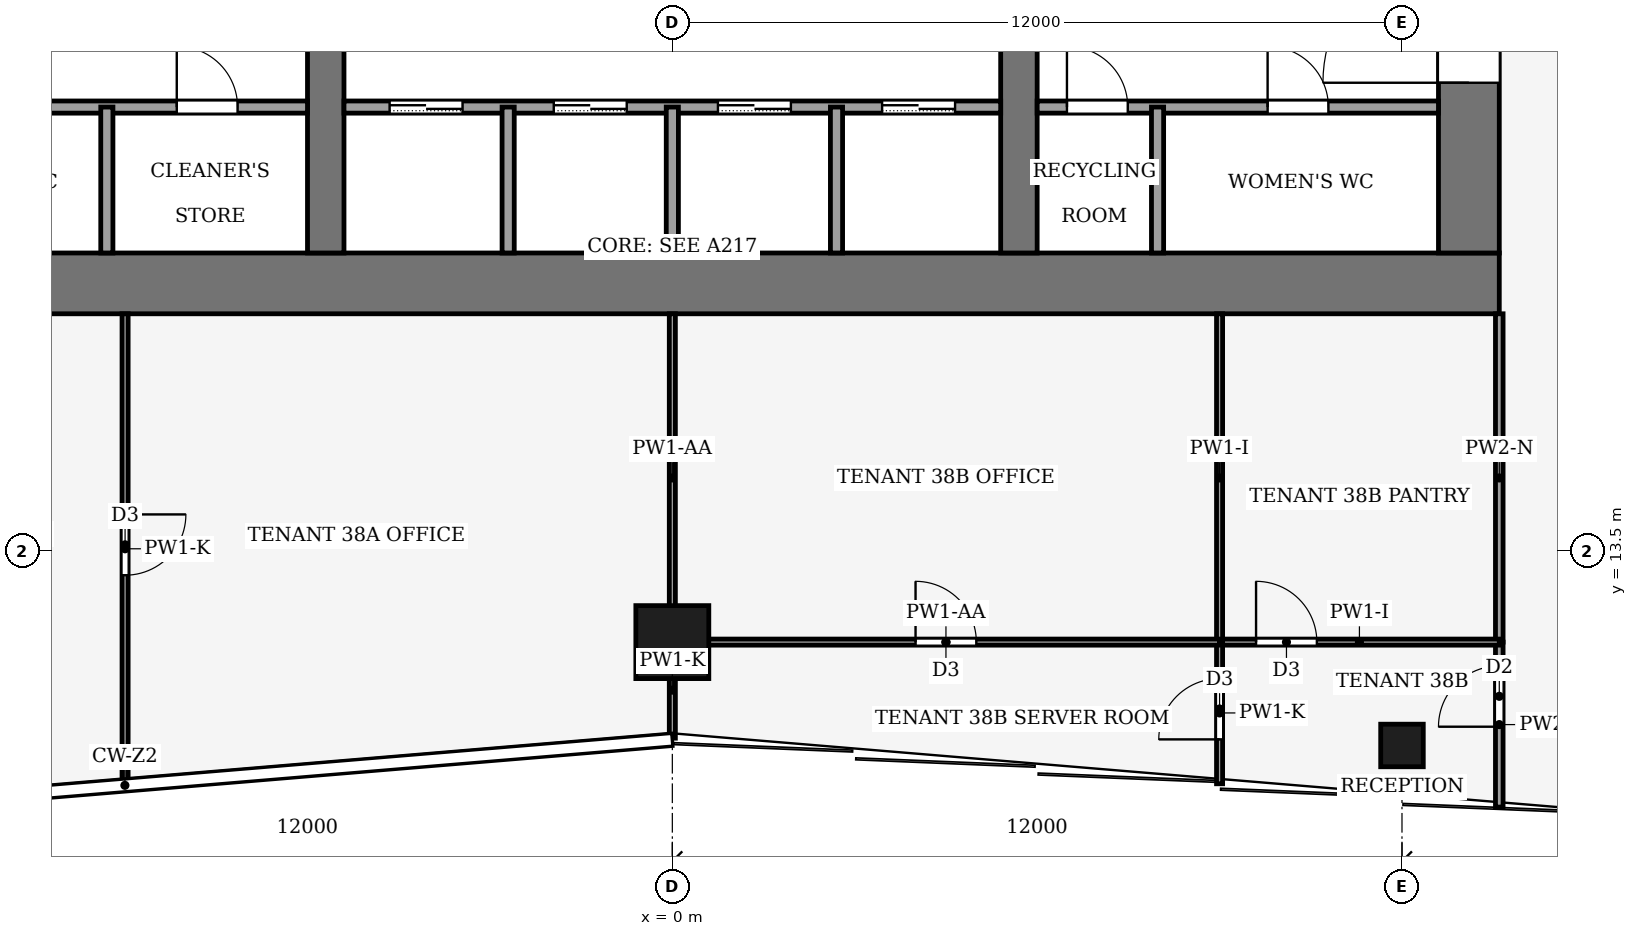
"""IFC4 building model, lengths in metres.
Left out: names, types, materials, properties, quantities, classifications, styles, units other than length and angle.
Written with IfcOpenShell. Run it as: python <this file> out.ifc"""

import sys

from ifc_helpers import new_model, si_unit, direction, frame, frame_2d, origin, origin_2d, place, context, subcontext, project, spatial, rectangle, hollow_rectangle, extrude, element, fill, save


model = new_model("IFC4")
c1 = context("Model", 3, precision=1e-05, world=origin(), true_north=direction((0.0, 1.0)))
c2 = subcontext(c1, "Body", "Model", "MODEL_VIEW")
j1 = project(units=[si_unit("LENGTHUNIT", "METRE"), si_unit("PLANEANGLEUNIT", "RADIAN")], contexts=[c1])
p1 = place(None, origin())
s1 = spatial("IfcSite", under=j1, at=p1, CompositionType="ELEMENT")
p2 = place(p1, origin())
s2 = spatial("IfcBuilding", under=s1, at=p2, CompositionType="ELEMENT")
p3 = place(p2, frame((0.0, 0.0, 166.0)))
s3 = spatial("IfcBuildingStorey", under=s2, at=p3, CompositionType="ELEMENT", Elevation=166.0)
p4 = place(p3, frame((-13.6, 17.9, -0.13), z_axis=(0.0, 0.0, 1.0), x_axis=(1.0, 0.0, 0.0)))
e1 = element("IfcWall", 1, at=p4, inside=s3, PredefinedType="SHEAR", context=c2, shape_type="SweptSolid", body=[
    extrude(rectangle(XDim=27.2, YDim=1.0, at=frame_2d((13.6, 0.0))), origin(), (0.0, 0.0, 1.0), 3.88),
])
p5 = place(p3, frame((13.1, 18.4, -0.13), z_axis=(0.0, 0.0, 1.0), x_axis=(0.0, 1.0, 0.0)))
e2 = element("IfcWall", 2, at=p5, inside=s3, PredefinedType="SHEAR", context=c2, shape_type="SweptSolid", body=[
    extrude(rectangle(XDim=19.2, YDim=1.0, at=frame_2d((9.6, 0.0))), origin(), (0.0, 0.0, 1.0), 3.88),
])
p6 = place(p5, frame((2.8, 0.0, 0.13)))
e3 = element("IfcOpeningElement", 3, at=p6, cuts=e2, PredefinedType="OPENING", context=c2, shape_type="SweptSolid", body=[
    extrude(rectangle(XDim=2.4, YDim=2.4, at=frame_2d((1.2, 1.2))), frame((0.0, 0.51, 0.0), z_axis=(0.0, -1.0, 0.0), x_axis=(1.0, 0.0, 0.0)), (0.0, 0.0, 1.0), 1.02),
])
p7 = place(p5, frame((13.3, 0.0, 0.13)))
e4 = element("IfcOpeningElement", 4, at=p7, cuts=e2, PredefinedType="OPENING", context=c2, shape_type="SweptSolid", body=[
    extrude(rectangle(XDim=2.4, YDim=2.4, at=frame_2d((1.2, 1.2))), frame((0.0, 0.51, 0.0), z_axis=(0.0, -1.0, 0.0), x_axis=(1.0, 0.0, 0.0)), (0.0, 0.0, 1.0), 1.02),
])
p8 = place(p3, frame((-5.7, 18.4, -0.13), z_axis=(0.0, 0.0, 1.0), x_axis=(0.0, 1.0, 0.0)))
e5 = element("IfcWall", 5, at=p8, inside=s3, PredefinedType="SHEAR", context=c2, shape_type="SweptSolid", body=[
    extrude(rectangle(XDim=19.2, YDim=0.6, at=frame_2d((9.6, 0.0))), origin(), (0.0, 0.0, 1.0), 3.88),
])
p9 = place(p8, frame((8.35, 0.0, 0.13)))
e6 = element("IfcOpeningElement", 6, at=p9, cuts=e5, PredefinedType="OPENING", context=c2, shape_type="SweptSolid", body=[
    extrude(rectangle(XDim=0.9, YDim=2.1, at=frame_2d((0.45, 1.05))), frame((0.0, 0.31, 0.0), z_axis=(0.0, -1.0, 0.0), x_axis=(1.0, 0.0, 0.0)), (0.0, 0.0, 1.0), 0.62),
])
p10 = place(p3, frame((5.7, 18.4, -0.13), z_axis=(0.0, 0.0, 1.0), x_axis=(0.0, 1.0, 0.0)))
e7 = element("IfcWall", 7, at=p10, inside=s3, PredefinedType="SHEAR", context=c2, shape_type="SweptSolid", body=[
    extrude(rectangle(XDim=19.2, YDim=0.6, at=frame_2d((9.6, 0.0))), origin(), (0.0, 0.0, 1.0), 3.88),
])
p11 = place(p10, frame((8.35, 0.0, 0.13)))
e8 = element("IfcOpeningElement", 8, at=p11, cuts=e7, PredefinedType="OPENING", context=c2, shape_type="SweptSolid", body=[
    extrude(rectangle(XDim=0.9, YDim=2.1, at=frame_2d((0.45, 1.05))), frame((0.0, 0.31, 0.0), z_axis=(0.0, -1.0, 0.0), x_axis=(1.0, 0.0, 0.0)), (0.0, 0.0, 1.0), 0.62),
])
p12 = place(p10, frame((13.3, 0.0, 0.13)))
e9 = element("IfcOpeningElement", 9, at=p12, cuts=e7, PredefinedType="OPENING", context=c2, shape_type="SweptSolid", body=[
    extrude(rectangle(XDim=2.4, YDim=2.4, at=frame_2d((1.2, 1.2))), frame((0.0, 0.31, 0.0), z_axis=(0.0, -1.0, 0.0), x_axis=(1.0, 0.0, 0.0)), (0.0, 0.0, 1.0), 0.62),
])
p13 = place(p3, frame((0.0, 12.0, 0.0), z_axis=(0.0, 0.0, 1.0), x_axis=(1.0, 0.0, 0.0)))
e10 = element("IfcColumn", 10, at=p13, inside=s3, PredefinedType="COLUMN", context=c2, shape_type="SweptSolid", body=[
    extrude(hollow_rectangle(XDim=1.2, YDim=1.2, WallThickness=0.07, at=origin_2d()), origin(), (0.0, 0.0, 1.0), 4.0),
])
p14 = place(p3, frame((12.0, 10.3, 0.0), z_axis=(0.0, 0.0, 1.0), x_axis=(1.0, 0.0, 0.0)))
e11 = element("IfcColumn", 11, at=p14, inside=s3, PredefinedType="COLUMN", context=c2, shape_type="SweptSolid", body=[
    extrude(hollow_rectangle(XDim=0.7, YDim=0.7, WallThickness=0.03, at=origin_2d()), origin(), (0.0, 0.0, 1.0), 4.0),
])
p15 = place(p3, frame((-12.6, 20.8, 0.0), z_axis=(0.0, 0.0, 1.0), x_axis=(1.0, 0.0, 0.0)))
e12 = element("IfcWall", 12, at=p15, inside=s3, PredefinedType="PARTITIONING", context=c2, shape_type="SweptSolid", body=[
    extrude(rectangle(XDim=6.6, YDim=0.2, at=frame_2d((3.3, 0.0))), origin(), (0.0, 0.0, 1.0), 3.75),
])
p16 = place(p15, frame((1.15, 0.0, 0.0)))
e13 = element("IfcOpeningElement", 13, at=p16, cuts=e12, PredefinedType="OPENING", context=c2, shape_type="SweptSolid", body=[
    extrude(rectangle(XDim=1.0, YDim=2.1, at=frame_2d((0.5, 1.05))), frame((0.0, 0.11, 0.0), z_axis=(0.0, -1.0, 0.0), x_axis=(1.0, 0.0, 0.0)), (0.0, 0.0, 1.0), 0.22),
])
p17 = place(p15, frame((4.45, 0.0, 0.0)))
e14 = element("IfcOpeningElement", 14, at=p17, cuts=e12, PredefinedType="OPENING", context=c2, shape_type="SweptSolid", body=[
    extrude(rectangle(XDim=1.0, YDim=2.1, at=frame_2d((0.5, 1.05))), frame((0.0, 0.11, 0.0), z_axis=(0.0, -1.0, 0.0), x_axis=(1.0, 0.0, 0.0)), (0.0, 0.0, 1.0), 0.22),
])
p18 = place(p3, frame((-5.4, 20.8, 0.0), z_axis=(0.0, 0.0, 1.0), x_axis=(1.0, 0.0, 0.0)))
e15 = element("IfcWall", 15, at=p18, inside=s3, PredefinedType="PARTITIONING", context=c2, shape_type="SweptSolid", body=[
    extrude(rectangle(XDim=10.8, YDim=0.2, at=frame_2d((5.4, 0.0))), origin(), (0.0, 0.0, 1.0), 3.75),
])
p19 = place(p18, frame((0.75, 0.0, 0.0)))
e16 = element("IfcOpeningElement", 16, at=p19, cuts=e15, PredefinedType="OPENING", context=c2, shape_type="SweptSolid", body=[
    extrude(rectangle(XDim=1.2, YDim=2.2, at=frame_2d((0.6, 1.1))), frame((0.0, 0.11, 0.0), z_axis=(0.0, -1.0, 0.0), x_axis=(1.0, 0.0, 0.0)), (0.0, 0.0, 1.0), 0.22),
])
p20 = place(p18, frame((3.45, 0.0, 0.0)))
e17 = element("IfcOpeningElement", 17, at=p20, cuts=e15, PredefinedType="OPENING", context=c2, shape_type="SweptSolid", body=[
    extrude(rectangle(XDim=1.2, YDim=2.2, at=frame_2d((0.6, 1.1))), frame((0.0, 0.11, 0.0), z_axis=(0.0, -1.0, 0.0), x_axis=(1.0, 0.0, 0.0)), (0.0, 0.0, 1.0), 0.22),
])
p21 = place(p18, frame((6.15, 0.0, 0.0)))
e18 = element("IfcOpeningElement", 18, at=p21, cuts=e15, PredefinedType="OPENING", context=c2, shape_type="SweptSolid", body=[
    extrude(rectangle(XDim=1.2, YDim=2.2, at=frame_2d((0.6, 1.1))), frame((0.0, 0.11, 0.0), z_axis=(0.0, -1.0, 0.0), x_axis=(1.0, 0.0, 0.0)), (0.0, 0.0, 1.0), 0.22),
])
p22 = place(p18, frame((8.85, 0.0, 0.0)))
e19 = element("IfcOpeningElement", 19, at=p22, cuts=e15, PredefinedType="OPENING", context=c2, shape_type="SweptSolid", body=[
    extrude(rectangle(XDim=1.2, YDim=2.2, at=frame_2d((0.6, 1.1))), frame((0.0, 0.11, 0.0), z_axis=(0.0, -1.0, 0.0), x_axis=(1.0, 0.0, 0.0)), (0.0, 0.0, 1.0), 0.22),
])
p23 = place(p3, frame((6.0, 20.8, 0.0), z_axis=(0.0, 0.0, 1.0), x_axis=(1.0, 0.0, 0.0)))
e20 = element("IfcWall", 20, at=p23, inside=s3, PredefinedType="PARTITIONING", context=c2, shape_type="SweptSolid", body=[
    extrude(rectangle(XDim=6.6, YDim=0.2, at=frame_2d((3.3, 0.0))), origin(), (0.0, 0.0, 1.0), 3.75),
])
p24 = place(p23, frame((0.49, 0.0, 0.0)))
e21 = element("IfcOpeningElement", 21, at=p24, cuts=e20, PredefinedType="OPENING", context=c2, shape_type="SweptSolid", body=[
    extrude(rectangle(XDim=1.0, YDim=2.1, at=frame_2d((0.5, 1.05))), frame((0.0, 0.11, 0.0), z_axis=(0.0, -1.0, 0.0), x_axis=(1.0, 0.0, 0.0)), (0.0, 0.0, 1.0), 0.22),
])
p25 = place(p23, frame((3.79, 0.0, 0.0)))
e22 = element("IfcOpeningElement", 22, at=p25, cuts=e20, PredefinedType="OPENING", context=c2, shape_type="SweptSolid", body=[
    extrude(rectangle(XDim=1.0, YDim=2.1, at=frame_2d((0.5, 1.05))), frame((0.0, 0.11, 0.0), z_axis=(0.0, -1.0, 0.0), x_axis=(1.0, 0.0, 0.0)), (0.0, 0.0, 1.0), 0.22),
])
for number, where, z_axis, x_axis in (
    (23, (-9.3, 18.4, 0.0), (0.0, 0.0, 1.0), (0.0, 1.0, 0.0)),
    (24, (-2.7, 18.4, 0.0), (0.0, 0.0, 1.0), (0.0, 1.0, 0.0)),
    (25, (0.0, 18.4, 0.0), (0.0, 0.0, 1.0), (0.0, 1.0, 0.0)),
    (26, (2.7, 18.4, 0.0), (0.0, 0.0, 1.0), (0.0, 1.0, 0.0)),
    (27, (7.98, 18.4, 0.0), (0.0, 0.0, 1.0), (0.0, 1.0, 0.0)),
):
    element("IfcWall", number, at=place(p3, frame(where, z_axis=z_axis, x_axis=x_axis)), inside=s3, PredefinedType="PARTITIONING", context=c2, shape_type="SweptSolid", body=[
        extrude(rectangle(XDim=2.4, YDim=0.2, at=frame_2d((1.2, 0.0))), origin(), (0.0, 0.0, 1.0), 3.75),
    ])
p26 = place(p3, frame((13.6, 9.287, 0.0), z_axis=(0.0, 0.0, 1.0), x_axis=(0.0, 1.0, 0.0)))
e28 = element("IfcWall", 28, at=p26, inside=s3, PredefinedType="PARTITIONING", context=c2, shape_type="SweptSolid", body=[
    extrude(rectangle(XDim=2.713, YDim=0.125, at=frame_2d((1.357, 0.0))), origin(), (0.0, 0.0, 1.0), 2.92),
])
p27 = place(p26, frame((1.322, 0.0, 0.0)))
e29 = element("IfcOpeningElement", 29, at=p27, cuts=e28, PredefinedType="OPENING", context=c2, shape_type="SweptSolid", body=[
    extrude(rectangle(XDim=1.0, YDim=2.1, at=frame_2d((0.5, 1.05))), frame((0.0, 0.073, 0.0), z_axis=(0.0, -1.0, 0.0), x_axis=(1.0, 0.0, 0.0)), (0.0, 0.0, 1.0), 0.145),
])
p28 = place(p3, frame((13.6, 12.0, 0.0), z_axis=(0.0, 0.0, 1.0), x_axis=(0.0, 1.0, 0.0)))
e30 = element("IfcWall", 30, at=p28, inside=s3, PredefinedType="PARTITIONING", context=c2, shape_type="SweptSolid", body=[
    extrude(rectangle(XDim=5.4, YDim=0.125, at=frame_2d((2.7, 0.0))), origin(), (0.0, 0.0, 1.0), 3.02),
])
p29 = place(p3, frame((-9.0, 17.4, 0.0), z_axis=(0.0, 0.0, 1.0), x_axis=(0.0, -1.0, 0.0)))
e31 = element("IfcWall", 31, at=p29, inside=s3, PredefinedType="PARTITIONING", context=c2, shape_type="SweptSolid", body=[
    extrude(rectangle(XDim=7.73, YDim=0.1, at=frame_2d((3.865, 0.0))), origin(), (0.0, 0.0, 1.0), 2.92),
])
p30 = place(p29, frame((3.3, 0.0, 0.0)))
e32 = element("IfcOpeningElement", 32, at=p30, cuts=e31, PredefinedType="OPENING", context=c2, shape_type="SweptSolid", body=[
    extrude(rectangle(XDim=1.0, YDim=2.1, at=frame_2d((0.5, 1.05))), frame((0.0, 0.06, 0.0), z_axis=(0.0, -1.0, 0.0), x_axis=(1.0, 0.0, 0.0)), (0.0, 0.0, 1.0), 0.12),
])
p31 = place(p3, frame((0.0, 10.42, 0.0), z_axis=(0.0, 0.0, 1.0), x_axis=(0.0, 1.0, 0.0)))
e33 = element("IfcWall", 33, at=p31, inside=s3, PredefinedType="PARTITIONING", context=c2, shape_type="SweptSolid", body=[
    extrude(rectangle(XDim=1.58, YDim=0.1, at=frame_2d((0.79, 0.0))), origin(), (0.0, 0.0, 1.0), 2.92),
])
p32 = place(p3, frame((0.0, 12.0, 0.0), z_axis=(0.0, 0.0, 1.0), x_axis=(0.0, 1.0, 0.0)))
e34 = element("IfcWall", 34, at=p32, inside=s3, PredefinedType="PARTITIONING", context=c2, shape_type="SweptSolid", body=[
    extrude(rectangle(XDim=5.4, YDim=0.1, at=frame_2d((2.7, 0.0))), origin(), (0.0, 0.0, 1.0), 3.42),
])
p33 = place(p3, frame((9.0, 12.0, 0.0), z_axis=(0.0, 0.0, 1.0), x_axis=(1.0, 0.0, 0.0)))
e35 = element("IfcWall", 35, at=p33, inside=s3, PredefinedType="PARTITIONING", context=c2, shape_type="SweptSolid", body=[
    extrude(rectangle(XDim=4.6, YDim=0.1, at=frame_2d((2.3, 0.0))), origin(), (0.0, 0.0, 1.0), 3.75),
])
p34 = place(p33, frame((0.6, 0.0, 0.0)))
e36 = element("IfcOpeningElement", 36, at=p34, cuts=e35, PredefinedType="OPENING", context=c2, shape_type="SweptSolid", body=[
    extrude(rectangle(XDim=1.0, YDim=2.1, at=frame_2d((0.5, 1.05))), frame((0.0, 0.06, 0.0), z_axis=(0.0, -1.0, 0.0), x_axis=(1.0, 0.0, 0.0)), (0.0, 0.0, 1.0), 0.12),
])
p35 = place(p3, frame((9.0, 9.67, 0.0), z_axis=(0.0, 0.0, 1.0), x_axis=(0.0, 1.0, 0.0)))
e37 = element("IfcWall", 37, at=p35, inside=s3, PredefinedType="PARTITIONING", context=c2, shape_type="SweptSolid", body=[
    extrude(rectangle(XDim=2.33, YDim=0.1, at=frame_2d((1.165, 0.0))), origin(), (0.0, 0.0, 1.0), 2.92),
])
p36 = place(p35, frame((0.73, 0.0, 0.0)))
e38 = element("IfcOpeningElement", 38, at=p36, cuts=e37, PredefinedType="OPENING", context=c2, shape_type="SweptSolid", body=[
    extrude(rectangle(XDim=1.0, YDim=2.1, at=frame_2d((0.5, 1.05))), frame((0.0, 0.06, 0.0), z_axis=(0.0, -1.0, 0.0), x_axis=(1.0, 0.0, 0.0)), (0.0, 0.0, 1.0), 0.12),
])
p37 = place(p3, frame((9.0, 17.4, 0.0), z_axis=(0.0, 0.0, 1.0), x_axis=(0.0, -1.0, 0.0)))
e39 = element("IfcWall", 39, at=p37, inside=s3, PredefinedType="PARTITIONING", context=c2, shape_type="SweptSolid", body=[
    extrude(rectangle(XDim=5.4, YDim=0.1, at=frame_2d((2.7, 0.0))), origin(), (0.0, 0.0, 1.0), 3.75),
])
p38 = place(p3, frame((0.0, 12.0, 0.0), z_axis=(0.0, 0.0, 1.0), x_axis=(1.0, 0.0, 0.0)))
e40 = element("IfcWall", 40, at=p38, inside=s3, PredefinedType="PARTITIONING", context=c2, shape_type="SweptSolid", body=[
    extrude(rectangle(XDim=9.0, YDim=0.1, at=frame_2d((4.5, 0.0))), origin(), (0.0, 0.0, 1.0), 3.42),
])
p39 = place(p38, frame((4.0, 0.0, 0.0)))
e41 = element("IfcOpeningElement", 41, at=p39, cuts=e40, PredefinedType="OPENING", context=c2, shape_type="SweptSolid", body=[
    extrude(rectangle(XDim=1.0, YDim=2.1, at=frame_2d((0.5, 1.05))), frame((0.0, 0.06, 0.0), z_axis=(0.0, -1.0, 0.0), x_axis=(1.0, 0.0, 0.0)), (0.0, 0.0, 1.0), 0.12),
])
p40 = place(p19, origin())
e42 = element("IfcDoor", 42, at=p40, inside=s3, OperationType="SLIDING_TO_LEFT", PredefinedType="DOOR", context=c2, shape_type="SweptSolid", body=[
    extrude(rectangle(XDim=1.2, YDim=2.2, at=frame_2d((0.6, 1.1))), frame((0.0, 0.025, 0.0), z_axis=(0.0, -1.0, 0.0), x_axis=(1.0, 0.0, 0.0)), (0.0, 0.0, 1.0), 0.05),
])
fill(e16, e42)
p41 = place(p20, origin())
e43 = element("IfcDoor", 43, at=p41, inside=s3, OperationType="SLIDING_TO_LEFT", PredefinedType="DOOR", context=c2, shape_type="SweptSolid", body=[
    extrude(rectangle(XDim=1.2, YDim=2.2, at=frame_2d((0.6, 1.1))), frame((0.0, 0.025, 0.0), z_axis=(0.0, -1.0, 0.0), x_axis=(1.0, 0.0, 0.0)), (0.0, 0.0, 1.0), 0.05),
])
fill(e17, e43)
p42 = place(p21, origin())
e44 = element("IfcDoor", 44, at=p42, inside=s3, OperationType="SLIDING_TO_LEFT", PredefinedType="DOOR", context=c2, shape_type="SweptSolid", body=[
    extrude(rectangle(XDim=1.2, YDim=2.2, at=frame_2d((0.6, 1.1))), frame((0.0, 0.025, 0.0), z_axis=(0.0, -1.0, 0.0), x_axis=(1.0, 0.0, 0.0)), (0.0, 0.0, 1.0), 0.05),
])
fill(e18, e44)
p43 = place(p22, origin())
e45 = element("IfcDoor", 45, at=p43, inside=s3, OperationType="SLIDING_TO_LEFT", PredefinedType="DOOR", context=c2, shape_type="SweptSolid", body=[
    extrude(rectangle(XDim=1.2, YDim=2.2, at=frame_2d((0.6, 1.1))), frame((0.0, 0.025, 0.0), z_axis=(0.0, -1.0, 0.0), x_axis=(1.0, 0.0, 0.0)), (0.0, 0.0, 1.0), 0.05),
])
fill(e19, e45)
p44 = place(p17, origin())
e46 = element("IfcDoor", 46, at=p44, inside=s3, OperationType="SINGLE_SWING_LEFT", PredefinedType="DOOR", context=c2, shape_type="SweptSolid", body=[
    extrude(rectangle(XDim=1.0, YDim=2.1, at=frame_2d((0.5, 1.05))), frame((0.0, 0.025, 0.0), z_axis=(0.0, -1.0, 0.0), x_axis=(1.0, 0.0, 0.0)), (0.0, 0.0, 1.0), 0.05),
])
fill(e14, e46)
p45 = place(p24, origin())
e47 = element("IfcDoor", 47, at=p45, inside=s3, OperationType="SINGLE_SWING_RIGHT", PredefinedType="DOOR", context=c2, shape_type="SweptSolid", body=[
    extrude(rectangle(XDim=1.0, YDim=2.1, at=frame_2d((0.5, 1.05))), frame((0.0, 0.025, 0.0), z_axis=(0.0, -1.0, 0.0), x_axis=(1.0, 0.0, 0.0)), (0.0, 0.0, 1.0), 0.05),
])
fill(e21, e47)
p46 = place(p25, origin())
e48 = element("IfcDoor", 48, at=p46, inside=s3, OperationType="SINGLE_SWING_RIGHT", PredefinedType="DOOR", context=c2, shape_type="SweptSolid", body=[
    extrude(rectangle(XDim=1.0, YDim=2.1, at=frame_2d((0.5, 1.05))), frame((0.0, 0.025, 0.0), z_axis=(0.0, -1.0, 0.0), x_axis=(1.0, 0.0, 0.0)), (0.0, 0.0, 1.0), 0.05),
])
fill(e22, e48)
p47 = place(p6, origin())
e49 = element("IfcDoor", 49, at=p47, inside=s3, OperationType="DOUBLE_DOOR_SINGLE_SWING", PredefinedType="DOOR", context=c2, shape_type="SweptSolid", body=[
    extrude(rectangle(XDim=2.4, YDim=2.4, at=frame_2d((1.2, 1.2))), frame((0.0, 0.025, 0.0), z_axis=(0.0, -1.0, 0.0), x_axis=(1.0, 0.0, 0.0)), (0.0, 0.0, 1.0), 0.05),
])
fill(e3, e49)
p48 = place(p27, origin())
e50 = element("IfcDoor", 50, at=p48, inside=s3, OperationType="SINGLE_SWING_RIGHT", PredefinedType="DOOR", context=c2, shape_type="SweptSolid", body=[
    extrude(rectangle(XDim=1.0, YDim=2.1, at=frame_2d((0.5, 1.05))), frame((0.0, 0.025, 0.0), z_axis=(0.0, -1.0, 0.0), x_axis=(1.0, 0.0, 0.0)), (0.0, 0.0, 1.0), 0.05),
])
fill(e29, e50)
p49 = place(p30, origin())
e51 = element("IfcDoor", 51, at=p49, inside=s3, OperationType="SINGLE_SWING_LEFT", PredefinedType="DOOR", context=c2, shape_type="SweptSolid", body=[
    extrude(rectangle(XDim=1.0, YDim=2.1, at=frame_2d((0.5, 1.05))), frame((0.0, 0.025, 0.0), z_axis=(0.0, -1.0, 0.0), x_axis=(1.0, 0.0, 0.0)), (0.0, 0.0, 1.0), 0.05),
])
fill(e32, e51)
p50 = place(p34, origin())
e52 = element("IfcDoor", 52, at=p50, inside=s3, OperationType="SINGLE_SWING_LEFT", PredefinedType="DOOR", context=c2, shape_type="SweptSolid", body=[
    extrude(rectangle(XDim=1.0, YDim=2.1, at=frame_2d((0.5, 1.05))), frame((0.0, 0.025, 0.0), z_axis=(0.0, -1.0, 0.0), x_axis=(1.0, 0.0, 0.0)), (0.0, 0.0, 1.0), 0.05),
])
fill(e36, e52)
p51 = place(p36, origin())
e53 = element("IfcDoor", 53, at=p51, inside=s3, OperationType="SINGLE_SWING_RIGHT", PredefinedType="DOOR", context=c2, shape_type="SweptSolid", body=[
    extrude(rectangle(XDim=1.0, YDim=2.1, at=frame_2d((0.5, 1.05))), frame((0.0, 0.025, 0.0), z_axis=(0.0, -1.0, 0.0), x_axis=(1.0, 0.0, 0.0)), (0.0, 0.0, 1.0), 0.05),
])
fill(e38, e53)
p52 = place(p39, origin())
e54 = element("IfcDoor", 54, at=p52, inside=s3, OperationType="SINGLE_SWING_RIGHT", PredefinedType="DOOR", context=c2, shape_type="SweptSolid", body=[
    extrude(rectangle(XDim=1.0, YDim=2.1, at=frame_2d((0.5, 1.05))), frame((0.0, 0.025, 0.0), z_axis=(0.0, -1.0, 0.0), x_axis=(1.0, 0.0, 0.0)), (0.0, 0.0, 1.0), 0.05),
])
fill(e41, e54)
save(model, sys.argv[1])
